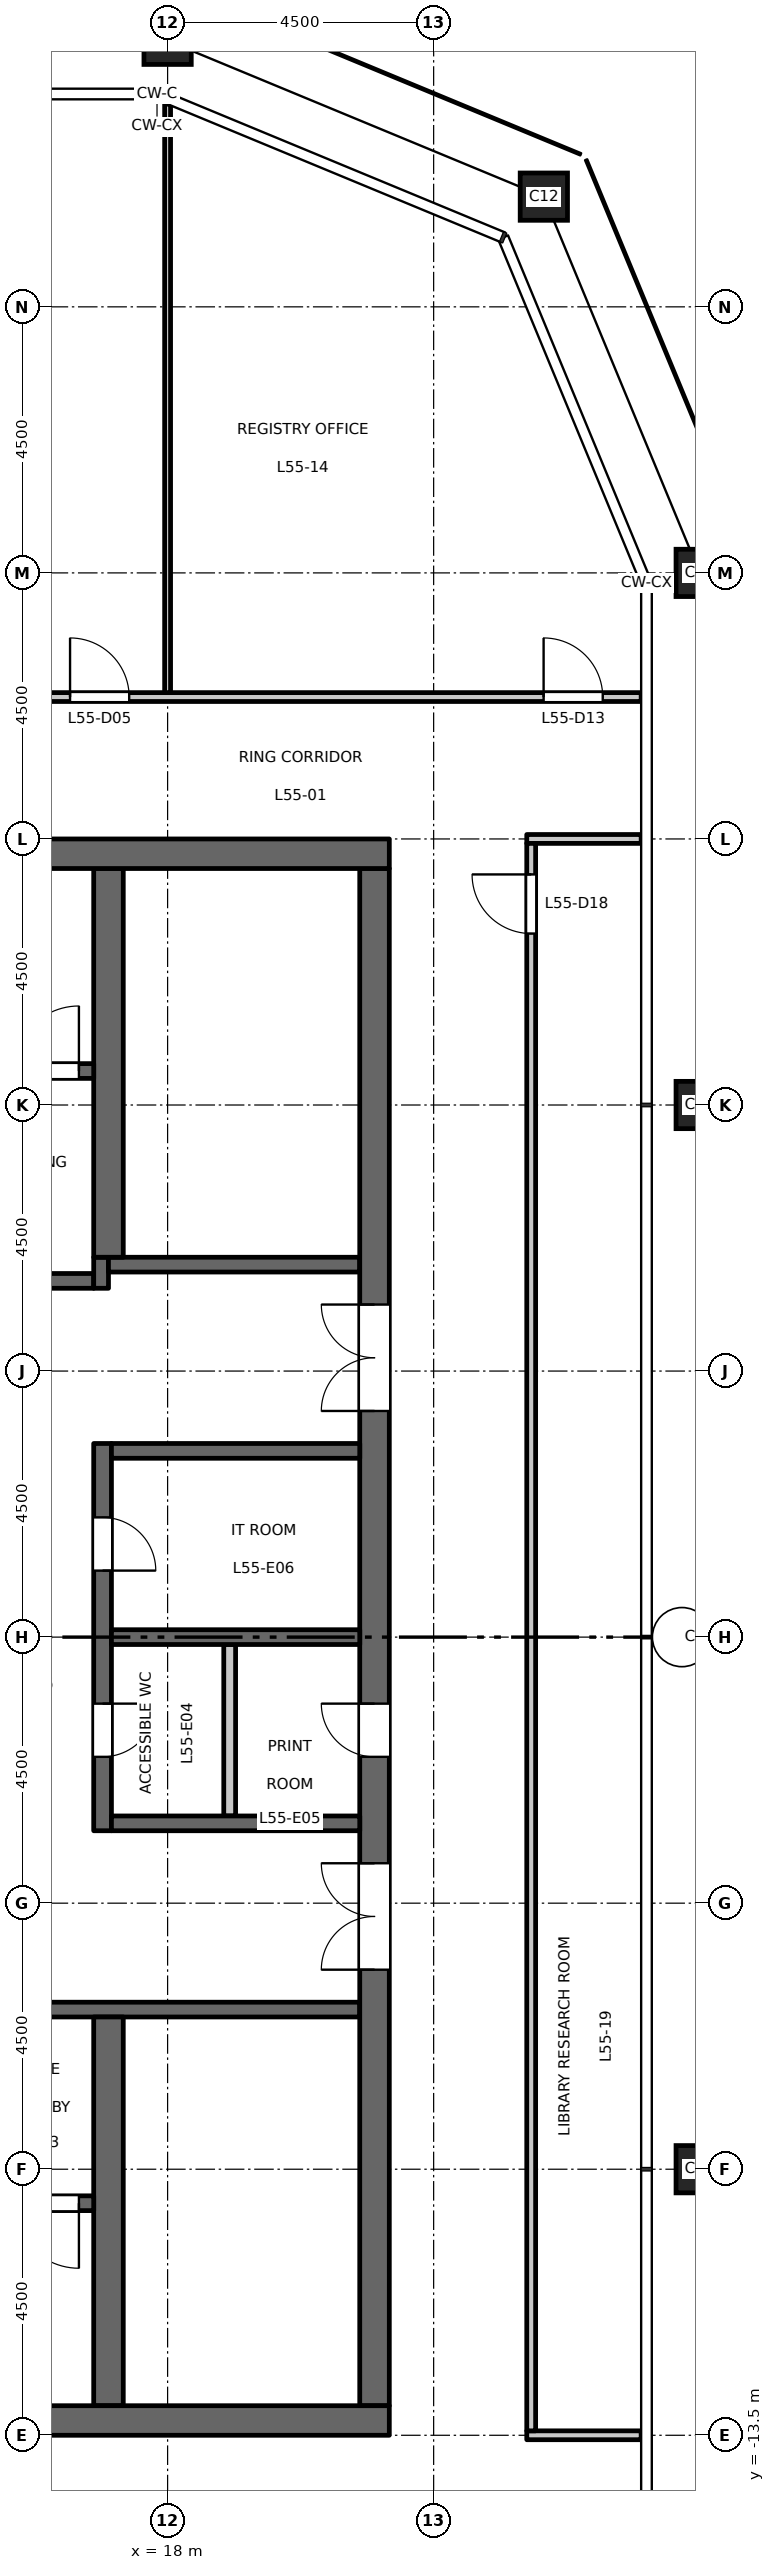
"""IFC4 building model, lengths in metres.
Left out: names, types, materials, properties, quantities, classifications, styles, units other than length and angle.
Written with IfcOpenShell. Run it as: python <this file> out.ifc"""

import sys

from ifc_helpers import new_model, si_unit, direction, frame, frame_2d, origin, origin_2d, place, context, subcontext, project, spatial, rectangle, hollow_rectangle, extrude, element, fill, save


model = new_model("IFC4")
c1 = context("Model", 3, precision=1e-05, world=origin(), true_north=direction((0.0, 1.0)))
c2 = subcontext(c1, "Body", "Model", "MODEL_VIEW")
j1 = project(units=[si_unit("LENGTHUNIT", "METRE"), si_unit("PLANEANGLEUNIT", "RADIAN")], contexts=[c1])
p1 = place(None, origin())
s1 = spatial("IfcSite", under=j1, at=p1, CompositionType="ELEMENT")
p2 = place(p1, origin())
s2 = spatial("IfcBuilding", under=s1, at=p2, CompositionType="ELEMENT")
p3 = place(p2, frame((0.0, 0.0, 255.7)))
s3 = spatial("IfcBuildingStorey", under=s2, at=p3, CompositionType="ELEMENT", Elevation=255.7)
for number, where, z_axis, x_axis in (
    (1, (27.0, -9.0, 0.0), (0.0, 0.0, 1.0), (1.0, 0.0, 0.0)),
    (2, (27.0, 0.0, 0.0), (0.0, 0.0, 1.0), (1.0, 0.0, 0.0)),
    (3, (27.0, 9.0, 0.0), (0.0, 0.0, 1.0), (1.0, 0.0, 0.0)),
    (4, (27.0, 18.0, 0.0), (0.0, 0.0, 1.0), (1.0, 0.0, 0.0)),
    (5, (24.364, 24.364, 0.0), (0.0, 0.0, 1.0), (1.0, 0.0, 0.0)),
    (6, (18.0, 27.0, 0.0), (0.0, 0.0, 1.0), (1.0, 0.0, 0.0)),
):
    element("IfcColumn", number, at=place(p3, frame(where, z_axis=z_axis, x_axis=x_axis)), inside=s3, PredefinedType="COLUMN", context=c2, shape_type="SweptSolid", body=[
        extrude(hollow_rectangle(XDim=0.8, YDim=0.8, WallThickness=0.045, at=origin_2d()), origin(), (0.0, 0.0, 1.0), 4.5),
    ])
p4 = place(p3, frame((12.15, 6.025, 0.0), z_axis=(0.0, 0.0, 1.0), x_axis=(1.0, 0.0, 0.0)))
e7 = element("IfcWall", 7, at=p4, inside=s3, PredefinedType="SHEAR", context=c2, shape_type="SweptSolid", body=[
    extrude(rectangle(XDim=4.6, YDim=0.25, at=frame_2d((2.3, 0.0))), origin(), (0.0, 0.0, 1.0), 4.35),
])
p5 = place(p4, frame((1.8, 0.0, 0.0)))
e8 = element("IfcOpeningElement", 8, at=p5, cuts=e7, PredefinedType="OPENING", context=c2, shape_type="SweptSolid", body=[
    extrude(rectangle(XDim=1.0, YDim=2.1, at=frame_2d((0.5, 1.05))), frame((0.0, 0.135, 0.0), z_axis=(0.0, -1.0, 0.0), x_axis=(1.0, 0.0, 0.0)), (0.0, 0.0, 1.0), 0.27),
])
p6 = place(p3, frame((16.875, 5.9, 0.0), z_axis=(0.0, 0.0, 1.0), x_axis=(0.0, 1.0, 0.0)))
e9 = element("IfcWall", 9, at=p6, inside=s3, PredefinedType="SHEAR", context=c2, shape_type="SweptSolid", body=[
    extrude(rectangle(XDim=0.525, YDim=0.25, at=frame_2d((0.263, 0.0))), origin(), (0.0, 0.0, 1.0), 4.35),
])
p7 = place(p3, frame((17.0, 6.3, 0.0), z_axis=(0.0, 0.0, 1.0), x_axis=(1.0, 0.0, 0.0)))
e10 = element("IfcWall", 10, at=p7, inside=s3, PredefinedType="SHEAR", context=c2, shape_type="SweptSolid", body=[
    extrude(rectangle(XDim=4.25, YDim=0.25, at=frame_2d((2.125, 0.0))), origin(), (0.0, 0.0, 1.0), 4.35),
])
p8 = place(p3, frame((12.15, -6.3, 0.0), z_axis=(0.0, 0.0, 1.0), x_axis=(1.0, 0.0, 0.0)))
e11 = element("IfcWall", 11, at=p8, inside=s3, PredefinedType="SHEAR", context=c2, shape_type="SweptSolid", body=[
    extrude(rectangle(XDim=9.1, YDim=0.25, at=frame_2d((4.55, 0.0))), origin(), (0.0, 0.0, 1.0), 4.35),
])
p9 = place(p8, frame((1.8, 0.0, 0.0)))
e12 = element("IfcOpeningElement", 12, at=p9, cuts=e11, PredefinedType="OPENING", context=c2, shape_type="SweptSolid", body=[
    extrude(rectangle(XDim=1.0, YDim=2.1, at=frame_2d((0.5, 1.05))), frame((0.0, 0.135, 0.0), z_axis=(0.0, -1.0, 0.0), x_axis=(1.0, 0.0, 0.0)), (0.0, 0.0, 1.0), 0.27),
])
p10 = place(p3, frame((21.5, -13.0, 0.0), z_axis=(0.0, 0.0, 1.0), x_axis=(0.0, 1.0, 0.0)))
e13 = element("IfcWall", 13, at=p10, inside=s3, PredefinedType="SHEAR", context=c2, shape_type="SweptSolid", body=[
    extrude(rectangle(XDim=26.0, YDim=0.5, at=frame_2d((13.0, 0.0))), origin(), (0.0, 0.0, 1.0), 4.35),
])
p11 = place(p10, frame((16.825, 0.0, 0.0)))
e14 = element("IfcOpeningElement", 14, at=p11, cuts=e13, PredefinedType="OPENING", context=c2, shape_type="SweptSolid", body=[
    extrude(rectangle(XDim=1.8, YDim=2.1, at=frame_2d((0.9, 1.05))), frame((0.0, 0.26, 0.0), z_axis=(0.0, -1.0, 0.0), x_axis=(1.0, 0.0, 0.0)), (0.0, 0.0, 1.0), 0.52),
])
p12 = place(p10, frame((7.375, 0.0, 0.0)))
e15 = element("IfcOpeningElement", 15, at=p12, cuts=e13, PredefinedType="OPENING", context=c2, shape_type="SweptSolid", body=[
    extrude(rectangle(XDim=1.8, YDim=2.1, at=frame_2d((0.9, 1.05))), frame((0.0, 0.26, 0.0), z_axis=(0.0, -1.0, 0.0), x_axis=(1.0, 0.0, 0.0)), (0.0, 0.0, 1.0), 0.52),
])
p13 = place(p10, frame((10.975, 0.0, 0.0)))
e16 = element("IfcOpeningElement", 16, at=p13, cuts=e13, PredefinedType="OPENING", context=c2, shape_type="SweptSolid", body=[
    extrude(rectangle(XDim=0.9, YDim=2.1, at=frame_2d((0.45, 1.05))), frame((0.0, 0.26, 0.0), z_axis=(0.0, -1.0, 0.0), x_axis=(1.0, 0.0, 0.0)), (0.0, 0.0, 1.0), 0.52),
])
p14 = place(p3, frame((16.9, -3.275, 0.0), z_axis=(0.0, 0.0, 1.0), x_axis=(0.0, 1.0, 0.0)))
e17 = element("IfcWall", 17, at=p14, inside=s3, PredefinedType="SHEAR", context=c2, shape_type="SweptSolid", body=[
    extrude(rectangle(XDim=6.55, YDim=0.3, at=frame_2d((3.275, 0.0))), origin(), (0.0, 0.0, 1.0), 4.35),
])
p15 = place(p14, frame((1.25, 0.0, 0.0)))
e18 = element("IfcOpeningElement", 18, at=p15, cuts=e17, PredefinedType="OPENING", context=c2, shape_type="SweptSolid", body=[
    extrude(rectangle(XDim=0.9, YDim=2.1, at=frame_2d((0.45, 1.05))), frame((0.0, 0.16, 0.0), z_axis=(0.0, -1.0, 0.0), x_axis=(1.0, 0.0, 0.0)), (0.0, 0.0, 1.0), 0.32),
])
p16 = place(p14, frame((4.4, 0.0, 0.0)))
e19 = element("IfcOpeningElement", 19, at=p16, cuts=e17, PredefinedType="OPENING", context=c2, shape_type="SweptSolid", body=[
    extrude(rectangle(XDim=0.9, YDim=2.1, at=frame_2d((0.45, 1.05))), frame((0.0, 0.16, 0.0), z_axis=(0.0, -1.0, 0.0), x_axis=(1.0, 0.0, 0.0)), (0.0, 0.0, 1.0), 0.32),
])
for number, where, z_axis, x_axis in (
    (20, (17.05, 0.0, 0.0), (0.0, 0.0, 1.0), (1.0, 0.0, 0.0)),
    (21, (17.05, 3.15, 0.0), (0.0, 0.0, 1.0), (1.0, 0.0, 0.0)),
    (22, (17.05, -3.15, 0.0), (0.0, 0.0, 1.0), (1.0, 0.0, 0.0)),
):
    element("IfcWall", number, at=place(p3, frame(where, z_axis=z_axis, x_axis=x_axis)), inside=s3, PredefinedType="SHEAR", context=c2, shape_type="SweptSolid", body=[
        extrude(rectangle(XDim=4.2, YDim=0.25, at=frame_2d((2.1, 0.0))), origin(), (0.0, 0.0, 1.0), 4.35),
    ])
p17 = place(p3, frame((19.05, -3.025, 0.0), z_axis=(0.0, 0.0, 1.0), x_axis=(0.0, 1.0, 0.0)))
e23 = element("IfcWall", 23, at=p17, inside=s3, PredefinedType="PARTITIONING", context=c2, shape_type="SweptSolid", body=[
    extrude(rectangle(XDim=2.9, YDim=0.2, at=frame_2d((1.45, 0.0))), origin(), (0.0, 0.0, 1.0), 4.35),
])
for number, where, z_axis, x_axis in (
    (24, (17.0, 6.425, 0.0), (0.0, 0.0, 1.0), (0.0, 1.0, 0.0)),
    (25, (17.0, -13.0, 0.0), (0.0, 0.0, 1.0), (0.0, 1.0, 0.0)),
):
    element("IfcWall", number, at=place(p3, frame(where, z_axis=z_axis, x_axis=x_axis)), inside=s3, PredefinedType="SHEAR", context=c2, shape_type="SweptSolid", body=[
        extrude(rectangle(XDim=6.575, YDim=0.5, at=frame_2d((3.288, 0.0))), origin(), (0.0, 0.0, 1.0), 4.35),
    ])
p18 = place(p3, frame((8.75, 9.575, 0.0), z_axis=(0.0, 0.0, 1.0), x_axis=(1.0, 0.0, 0.0)))
e26 = element("IfcWall", 26, at=p18, inside=s3, PredefinedType="SHEAR", context=c2, shape_type="SweptSolid", body=[
    extrude(rectangle(XDim=8.0, YDim=0.25, at=frame_2d((4.0, 0.0))), origin(), (0.0, 0.0, 1.0), 4.35),
])
p19 = place(p18, frame((6.65, 0.0, 0.0)))
e27 = element("IfcOpeningElement", 27, at=p19, cuts=e26, PredefinedType="OPENING", context=c2, shape_type="SweptSolid", body=[
    extrude(rectangle(XDim=1.1, YDim=2.1, at=frame_2d((0.55, 1.05))), frame((0.0, 0.135, 0.0), z_axis=(0.0, -1.0, 0.0), x_axis=(1.0, 0.0, 0.0)), (0.0, 0.0, 1.0), 0.27),
])
p20 = place(p3, frame((8.75, -9.575, 0.0), z_axis=(0.0, 0.0, 1.0), x_axis=(1.0, 0.0, 0.0)))
e28 = element("IfcWall", 28, at=p20, inside=s3, PredefinedType="SHEAR", context=c2, shape_type="SweptSolid", body=[
    extrude(rectangle(XDim=8.0, YDim=0.25, at=frame_2d((4.0, 0.0))), origin(), (0.0, 0.0, 1.0), 4.35),
])
p21 = place(p20, frame((6.65, 0.0, 0.0)))
e29 = element("IfcOpeningElement", 29, at=p21, cuts=e28, PredefinedType="OPENING", context=c2, shape_type="SweptSolid", body=[
    extrude(rectangle(XDim=1.1, YDim=2.1, at=frame_2d((0.55, 1.05))), frame((0.0, 0.135, 0.0), z_axis=(0.0, -1.0, 0.0), x_axis=(1.0, 0.0, 0.0)), (0.0, 0.0, 1.0), 0.27),
])
for number, where, z_axis, x_axis in (
    (30, (8.25, 13.25, 0.0), (0.0, 0.0, 1.0), (1.0, 0.0, 0.0)),
    (31, (8.25, -13.25, 0.0), (0.0, 0.0, 1.0), (1.0, 0.0, 0.0)),
):
    element("IfcWall", number, at=place(p3, frame(where, z_axis=z_axis, x_axis=x_axis)), inside=s3, PredefinedType="SHEAR", context=c2, shape_type="SweptSolid", body=[
        extrude(rectangle(XDim=13.5, YDim=0.5, at=frame_2d((6.75, 0.0))), origin(), (0.0, 0.0, 1.0), 4.35),
    ])
p22 = place(p3, frame((24.075, -13.5, 0.0), z_axis=(0.0, 0.0, 1.0), x_axis=(1.0, 0.0, 0.0)))
e32 = element("IfcWall", 32, at=p22, inside=s3, PredefinedType="PARTITIONING", context=c2, shape_type="SweptSolid", body=[
    extrude(rectangle(XDim=1.935, YDim=0.15, at=frame_2d((0.968, 0.0))), origin(), (0.0, 0.0, 1.0), 3.95),
])
p23 = place(p3, frame((24.075, 13.5, 0.0), z_axis=(0.0, 0.0, 1.0), x_axis=(1.0, 0.0, 0.0)))
e33 = element("IfcWall", 33, at=p23, inside=s3, PredefinedType="PARTITIONING", context=c2, shape_type="SweptSolid", body=[
    extrude(rectangle(XDim=1.935, YDim=0.15, at=frame_2d((0.968, 0.0))), origin(), (0.0, 0.0, 1.0), 4.35),
])
p24 = place(p3, frame((-26.01, 15.9, 0.0), z_axis=(0.0, 0.0, 1.0), x_axis=(1.0, 0.0, 0.0)))
e34 = element("IfcWall", 34, at=p24, inside=s3, PredefinedType="PARTITIONING", context=c2, shape_type="SweptSolid", body=[
    extrude(rectangle(XDim=52.02, YDim=0.15, at=frame_2d((26.01, 0.0))), origin(), (0.0, 0.0, 1.0), 4.35),
])
p25 = place(p24, frame((15.36, 0.0, 0.0)))
e35 = element("IfcOpeningElement", 35, at=p25, cuts=e34, PredefinedType="OPENING", context=c2, shape_type="SweptSolid", body=[
    extrude(rectangle(XDim=1.0, YDim=2.1, at=frame_2d((0.5, 1.05))), frame((0.0, 0.085, 0.0), z_axis=(0.0, -1.0, 0.0), x_axis=(1.0, 0.0, 0.0)), (0.0, 0.0, 1.0), 0.17),
])
p26 = place(p24, frame((24.36, 0.0, 0.0)))
e36 = element("IfcOpeningElement", 36, at=p26, cuts=e34, PredefinedType="OPENING", context=c2, shape_type="SweptSolid", body=[
    extrude(rectangle(XDim=1.0, YDim=2.1, at=frame_2d((0.5, 1.05))), frame((0.0, 0.085, 0.0), z_axis=(0.0, -1.0, 0.0), x_axis=(1.0, 0.0, 0.0)), (0.0, 0.0, 1.0), 0.17),
])
p27 = place(p24, frame((26.61, 0.0, 0.0)))
e37 = element("IfcOpeningElement", 37, at=p27, cuts=e34, PredefinedType="OPENING", context=c2, shape_type="SweptSolid", body=[
    extrude(rectangle(XDim=1.0, YDim=2.1, at=frame_2d((0.5, 1.05))), frame((0.0, 0.085, 0.0), z_axis=(0.0, -1.0, 0.0), x_axis=(1.0, 0.0, 0.0)), (0.0, 0.0, 1.0), 0.17),
])
p28 = place(p24, frame((42.36, 0.0, 0.0)))
e38 = element("IfcOpeningElement", 38, at=p28, cuts=e34, PredefinedType="OPENING", context=c2, shape_type="SweptSolid", body=[
    extrude(rectangle(XDim=1.0, YDim=2.1, at=frame_2d((0.5, 1.05))), frame((0.0, 0.085, 0.0), z_axis=(0.0, -1.0, 0.0), x_axis=(1.0, 0.0, 0.0)), (0.0, 0.0, 1.0), 0.17),
])
p29 = place(p24, frame((6.36, 0.0, 0.0)))
e39 = element("IfcOpeningElement", 39, at=p29, cuts=e34, PredefinedType="OPENING", context=c2, shape_type="SweptSolid", body=[
    extrude(rectangle(XDim=1.0, YDim=2.1, at=frame_2d((0.5, 1.05))), frame((0.0, 0.085, 0.0), z_axis=(0.0, -1.0, 0.0), x_axis=(1.0, 0.0, 0.0)), (0.0, 0.0, 1.0), 0.17),
])
p30 = place(p24, frame((50.37, 0.0, 0.0)))
e40 = element("IfcOpeningElement", 40, at=p30, cuts=e34, PredefinedType="OPENING", context=c2, shape_type="SweptSolid", body=[
    extrude(rectangle(XDim=1.0, YDim=2.1, at=frame_2d((0.5, 1.05))), frame((0.0, 0.085, 0.0), z_axis=(0.0, -1.0, 0.0), x_axis=(1.0, 0.0, 0.0)), (0.0, 0.0, 1.0), 0.17),
])
p31 = place(p3, frame((18.0, 15.975, 0.0), z_axis=(0.0, 0.0, 1.0), x_axis=(0.0, 1.0, 0.0)))
e41 = element("IfcWall", 41, at=p31, inside=s3, PredefinedType="PARTITIONING", context=c2, shape_type="SweptSolid", body=[
    extrude(rectangle(XDim=9.953, YDim=0.1, at=frame_2d((4.977, 0.0))), origin(), (0.0, 0.0, 1.0), 3.65),
])
p32 = place(p3, frame((24.15, -13.425, 0.0), z_axis=(0.0, 0.0, 1.0), x_axis=(0.0, 1.0, 0.0)))
e42 = element("IfcWall", 42, at=p32, inside=s3, PredefinedType="PARTITIONING", context=c2, shape_type="SweptSolid", body=[
    extrude(rectangle(XDim=26.85, YDim=0.15, at=frame_2d((13.425, 0.0))), origin(), (0.0, 0.0, 1.0), 4.35),
])
p33 = place(p32, frame((25.325, 0.0, 0.0)))
e43 = element("IfcOpeningElement", 43, at=p33, cuts=e42, PredefinedType="OPENING", context=c2, shape_type="SweptSolid", body=[
    extrude(rectangle(XDim=1.0, YDim=2.1, at=frame_2d((0.5, 1.05))), frame((0.0, 0.085, 0.0), z_axis=(0.0, -1.0, 0.0), x_axis=(1.0, 0.0, 0.0)), (0.0, 0.0, 1.0), 0.17),
])
p34 = place(p19, origin())
e44 = element("IfcDoor", 44, at=p34, inside=s3, OperationType="SINGLE_SWING_LEFT", PredefinedType="DOOR", context=c2, shape_type="SweptSolid", body=[
    extrude(rectangle(XDim=1.1, YDim=2.1, at=frame_2d((0.55, 1.05))), frame((0.0, 0.025, 0.0), z_axis=(0.0, -1.0, 0.0), x_axis=(1.0, 0.0, 0.0)), (0.0, 0.0, 1.0), 0.05),
])
fill(e27, e44)
p35 = place(p21, origin())
e45 = element("IfcDoor", 45, at=p35, inside=s3, OperationType="SINGLE_SWING_RIGHT", PredefinedType="DOOR", context=c2, shape_type="SweptSolid", body=[
    extrude(rectangle(XDim=1.1, YDim=2.1, at=frame_2d((0.55, 1.05))), frame((0.0, 0.025, 0.0), z_axis=(0.0, -1.0, 0.0), x_axis=(1.0, 0.0, 0.0)), (0.0, 0.0, 1.0), 0.05),
])
fill(e29, e45)
p36 = place(p11, origin())
e46 = element("IfcDoor", 46, at=p36, inside=s3, OperationType="DOUBLE_DOOR_DOUBLE_SWING", PredefinedType="DOOR", context=c2, shape_type="SweptSolid", body=[
    extrude(rectangle(XDim=1.8, YDim=2.1, at=frame_2d((0.9, 1.05))), frame((0.0, 0.025, 0.0), z_axis=(0.0, -1.0, 0.0), x_axis=(1.0, 0.0, 0.0)), (0.0, 0.0, 1.0), 0.05),
])
fill(e14, e46)
p37 = place(p12, origin())
e47 = element("IfcDoor", 47, at=p37, inside=s3, OperationType="DOUBLE_DOOR_DOUBLE_SWING", PredefinedType="DOOR", context=c2, shape_type="SweptSolid", body=[
    extrude(rectangle(XDim=1.8, YDim=2.1, at=frame_2d((0.9, 1.05))), frame((0.0, 0.025, 0.0), z_axis=(0.0, -1.0, 0.0), x_axis=(1.0, 0.0, 0.0)), (0.0, 0.0, 1.0), 0.05),
])
fill(e15, e47)
p38 = place(p15, origin())
e48 = element("IfcDoor", 48, at=p38, inside=s3, OperationType="SINGLE_SWING_RIGHT", PredefinedType="DOOR", context=c2, shape_type="SweptSolid", body=[
    extrude(rectangle(XDim=0.9, YDim=2.1, at=frame_2d((0.45, 1.05))), frame((0.0, 0.025, 0.0), z_axis=(0.0, -1.0, 0.0), x_axis=(1.0, 0.0, 0.0)), (0.0, 0.0, 1.0), 0.05),
])
fill(e18, e48)
p39 = place(p13, origin())
e49 = element("IfcDoor", 49, at=p39, inside=s3, OperationType="SINGLE_SWING_LEFT", PredefinedType="DOOR", context=c2, shape_type="SweptSolid", body=[
    extrude(rectangle(XDim=0.9, YDim=2.1, at=frame_2d((0.45, 1.05))), frame((0.0, 0.025, 0.0), z_axis=(0.0, -1.0, 0.0), x_axis=(1.0, 0.0, 0.0)), (0.0, 0.0, 1.0), 0.05),
])
fill(e16, e49)
p40 = place(p16, origin())
e50 = element("IfcDoor", 50, at=p40, inside=s3, OperationType="SINGLE_SWING_LEFT", PredefinedType="DOOR", context=c2, shape_type="SweptSolid", body=[
    extrude(rectangle(XDim=0.9, YDim=2.1, at=frame_2d((0.45, 1.05))), frame((0.0, 0.025, 0.0), z_axis=(0.0, -1.0, 0.0), x_axis=(1.0, 0.0, 0.0)), (0.0, 0.0, 1.0), 0.05),
])
fill(e19, e50)
p41 = place(p28, origin())
e51 = element("IfcDoor", 51, at=p41, inside=s3, OperationType="SINGLE_SWING_LEFT", PredefinedType="DOOR", context=c2, shape_type="SweptSolid", body=[
    extrude(rectangle(XDim=1.0, YDim=2.1, at=frame_2d((0.5, 1.05))), frame((0.0, 0.025, 0.0), z_axis=(0.0, -1.0, 0.0), x_axis=(1.0, 0.0, 0.0)), (0.0, 0.0, 1.0), 0.05),
])
fill(e38, e51)
p42 = place(p30, origin())
e52 = element("IfcDoor", 52, at=p42, inside=s3, OperationType="SINGLE_SWING_LEFT", PredefinedType="DOOR", context=c2, shape_type="SweptSolid", body=[
    extrude(rectangle(XDim=1.0, YDim=2.1, at=frame_2d((0.5, 1.05))), frame((0.0, 0.025, 0.0), z_axis=(0.0, -1.0, 0.0), x_axis=(1.0, 0.0, 0.0)), (0.0, 0.0, 1.0), 0.05),
])
fill(e40, e52)
p43 = place(p33, origin())
e53 = element("IfcDoor", 53, at=p43, inside=s3, OperationType="SINGLE_SWING_RIGHT", PredefinedType="DOOR", context=c2, shape_type="SweptSolid", body=[
    extrude(rectangle(XDim=1.0, YDim=2.1, at=frame_2d((0.5, 1.05))), frame((0.0, 0.025, 0.0), z_axis=(0.0, -1.0, 0.0), x_axis=(1.0, 0.0, 0.0)), (0.0, 0.0, 1.0), 0.05),
])
fill(e43, e53)
save(model, sys.argv[1])
